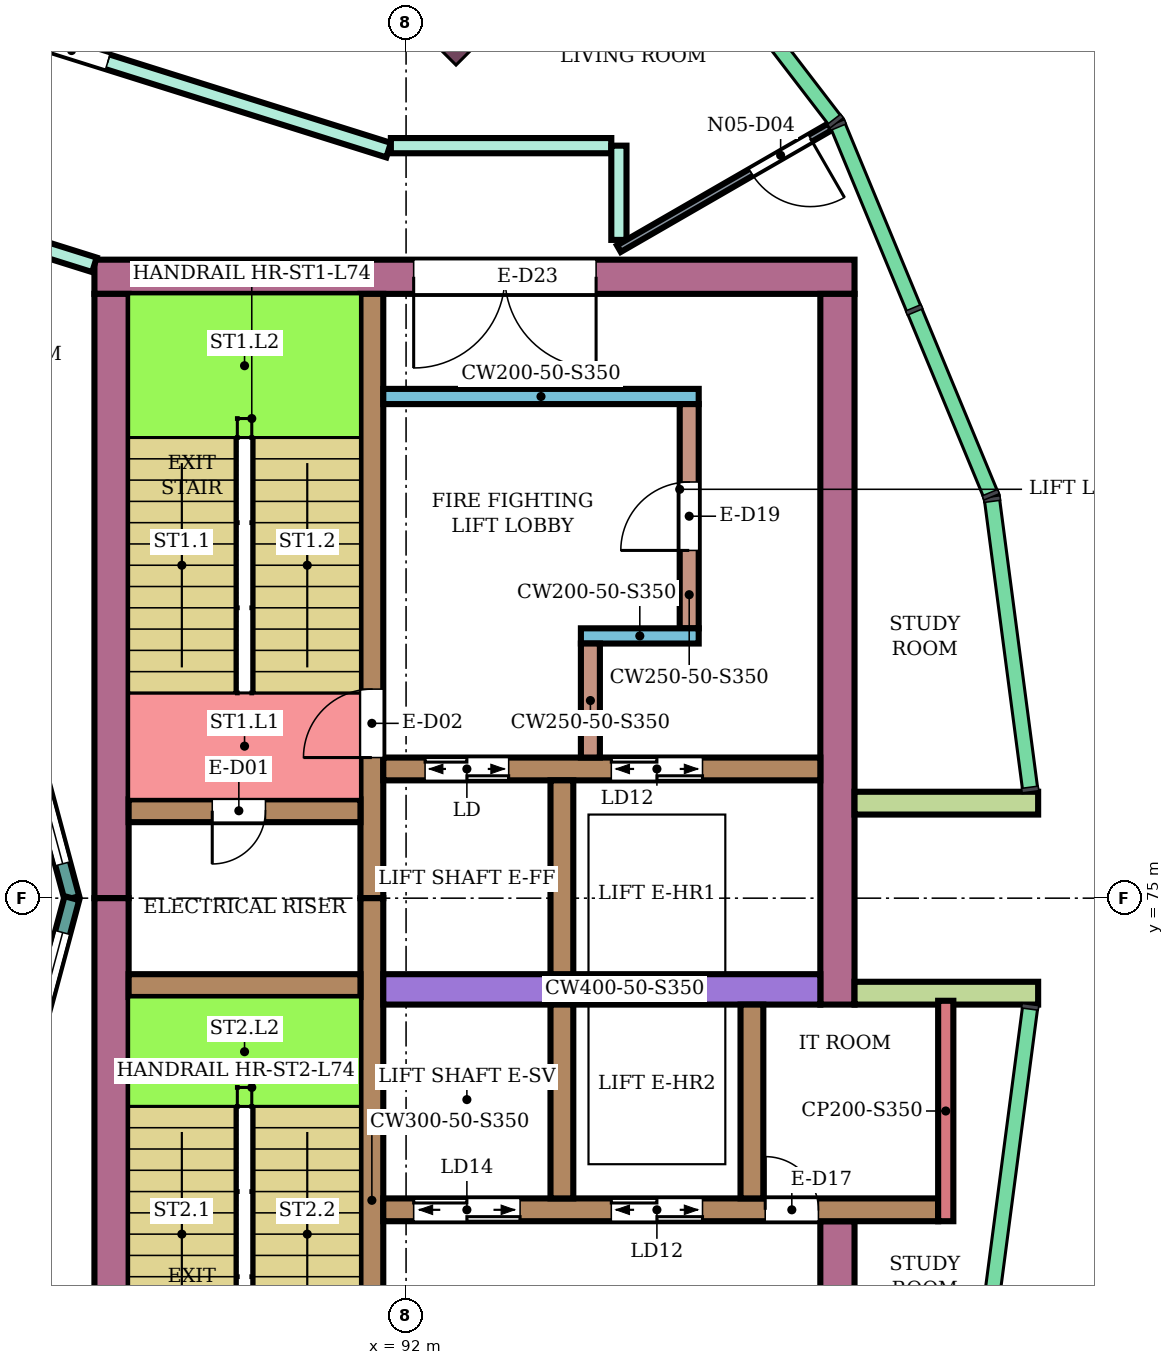
"""IFC4 building model, lengths in metres.
Left out: names, types, materials, properties, quantities, classifications, styles, units other than length and angle.
Written with IfcOpenShell. Run it as: python <this file> out.ifc"""

import sys

from ifc_helpers import new_model, si_unit, direction, frame, frame_2d, origin, origin_2d, place, context, subcontext, project, spatial, rectangle, extrude, element, fill, save


model = new_model("IFC4")
c1 = context("Model", 3, precision=1e-05, world=origin(), true_north=direction((0.0, 1.0)))
c2 = subcontext(c1, "Body", "Model", "MODEL_VIEW")
j1 = project(units=[si_unit("LENGTHUNIT", "METRE"), si_unit("PLANEANGLEUNIT", "RADIAN")], contexts=[c1])
p1 = place(None, origin())
s1 = spatial("IfcSite", under=j1, at=p1, CompositionType="ELEMENT")
p2 = place(p1, origin())
s2 = spatial("IfcBuilding", under=s1, at=p2, CompositionType="ELEMENT")
p3 = place(p2, frame((0.0, 0.0, 323.7)))
s3 = spatial("IfcBuildingStorey", under=s2, at=p3, CompositionType="ELEMENT", Elevation=323.7)
p4 = place(p3, frame((92.233, 87.233, 0.0), z_axis=(0.0, 0.0, 1.0), x_axis=(0.707106781187, 0.707106781187, 0.0)))
e1 = element("IfcColumn", 1, at=p4, inside=s3, PredefinedType="COLUMN", context=c2, shape_type="SweptSolid", body=[
    extrude(rectangle(XDim=1.2, YDim=2.4, at=origin_2d()), origin(), (0.0, 0.0, 1.0), 4.4),
])
p5 = place(p3, frame((87.9, 83.175, 0.0), z_axis=(0.0, 0.0, 1.0), x_axis=(1.0, 0.0, 0.0)))
e2 = element("IfcWall", 2, at=p5, inside=s3, PredefinedType="SHEAR", context=c2, shape_type="SweptSolid", body=[
    extrude(rectangle(XDim=10.0, YDim=0.45, at=frame_2d((5.0, 0.0))), origin(), (0.0, 0.0, 1.0), 4.05),
])
p6 = place(p5, frame((4.2, 0.0, 0.0)))
e3 = element("IfcOpeningElement", 3, at=p6, cuts=e2, PredefinedType="OPENING", context=c2, shape_type="SweptSolid", body=[
    extrude(rectangle(XDim=2.4, YDim=2.4, at=frame_2d((1.2, 1.2))), frame((0.0, 0.235, 0.0), z_axis=(0.0, -1.0, 0.0), x_axis=(1.0, 0.0, 0.0)), (0.0, 0.0, 1.0), 0.47),
])
for number, where, z_axis, x_axis in (
    (4, (88.125, 75.0, 0.0), (0.0, 0.0, 1.0), (0.0, 1.0, 0.0)),
    (5, (88.125, 67.05, 0.0), (0.0, 0.0, 1.0), (0.0, 1.0, 0.0)),
):
    element("IfcWall", number, at=place(p3, frame(where, z_axis=z_axis, x_axis=x_axis)), inside=s3, PredefinedType="SHEAR", context=c2, shape_type="SweptSolid", body=[
        extrude(rectangle(XDim=7.95, YDim=0.45, at=frame_2d((3.975, 0.0))), origin(), (0.0, 0.0, 1.0), 4.05),
    ])
p7 = place(p3, frame((97.675, 73.6, 0.0), z_axis=(0.0, 0.0, 1.0), x_axis=(0.0, 1.0, 0.0)))
e6 = element("IfcWall", 6, at=p7, inside=s3, PredefinedType="SHEAR", context=c2, shape_type="SweptSolid", body=[
    extrude(rectangle(XDim=9.35, YDim=0.45, at=frame_2d((4.675, 0.0))), origin(), (0.0, 0.0, 1.0), 4.05),
])
p8 = place(p3, frame((97.675, 67.05, 0.0), z_axis=(0.0, 0.0, 1.0), x_axis=(0.0, 1.0, 0.0)))
e7 = element("IfcWall", 7, at=p8, inside=s3, PredefinedType="SHEAR", context=c2, shape_type="SweptSolid", body=[
    extrude(rectangle(XDim=3.7, YDim=0.45, at=frame_2d((1.85, 0.0))), origin(), (0.0, 0.0, 1.0), 4.05),
])
p9 = place(p3, frame((91.55, 75.0, 0.0), z_axis=(0.0, 0.0, 1.0), x_axis=(0.0, 1.0, 0.0)))
e8 = element("IfcWall", 8, at=p9, inside=s3, PredefinedType="SHEAR", context=c2, shape_type="SweptSolid", body=[
    extrude(rectangle(XDim=7.95, YDim=0.3, at=frame_2d((3.975, 0.0))), origin(), (0.0, 0.0, 1.0), 4.05),
])
p10 = place(p9, frame((1.85, 0.0, 0.0)))
e9 = element("IfcOpeningElement", 9, at=p10, cuts=e8, PredefinedType="OPENING", context=c2, shape_type="SweptSolid", body=[
    extrude(rectangle(XDim=0.9, YDim=2.1, at=frame_2d((0.45, 1.05))), frame((0.0, 0.16, 0.0), z_axis=(0.0, -1.0, 0.0), x_axis=(1.0, 0.0, 0.0)), (0.0, 0.0, 1.0), 0.32),
])
p11 = place(p3, frame((91.55, 67.05, 0.0), z_axis=(0.0, 0.0, 1.0), x_axis=(0.0, 1.0, 0.0)))
e10 = element("IfcWall", 10, at=p11, inside=s3, PredefinedType="SHEAR", context=c2, shape_type="SweptSolid", body=[
    extrude(rectangle(XDim=7.95, YDim=0.3, at=frame_2d((3.975, 0.0))), origin(), (0.0, 0.0, 1.0), 4.05),
])
p12 = place(p11, frame((0.6, 0.0, 0.0)))
e11 = element("IfcOpeningElement", 11, at=p12, cuts=e10, PredefinedType="OPENING", context=c2, shape_type="SweptSolid", body=[
    extrude(rectangle(XDim=0.9, YDim=2.1, at=frame_2d((0.45, 1.05))), frame((0.0, 0.16, 0.0), z_axis=(0.0, -1.0, 0.0), x_axis=(1.0, 0.0, 0.0)), (0.0, 0.0, 1.0), 0.32),
])
p13 = place(p3, frame((88.35, 76.15, 0.0), z_axis=(0.0, 0.0, 1.0), x_axis=(1.0, 0.0, 0.0)))
e12 = element("IfcWall", 12, at=p13, inside=s3, PredefinedType="SHEAR", context=c2, shape_type="SweptSolid", body=[
    extrude(rectangle(XDim=3.05, YDim=0.3, at=frame_2d((1.525, 0.0))), origin(), (0.0, 0.0, 1.0), 4.05),
])
p14 = place(p13, frame((1.1, 0.0, 0.0)))
e13 = element("IfcOpeningElement", 13, at=p14, cuts=e12, PredefinedType="OPENING", context=c2, shape_type="SweptSolid", body=[
    extrude(rectangle(XDim=0.7, YDim=2.0, at=frame_2d((0.35, 1.0))), frame((0.0, 0.16, 0.0), z_axis=(0.0, -1.0, 0.0), x_axis=(1.0, 0.0, 0.0)), (0.0, 0.0, 1.0), 0.32),
])
p15 = place(p3, frame((88.35, 73.85, 0.0), z_axis=(0.0, 0.0, 1.0), x_axis=(1.0, 0.0, 0.0)))
e14 = element("IfcWall", 14, at=p15, inside=s3, PredefinedType="SHEAR", context=c2, shape_type="SweptSolid", body=[
    extrude(rectangle(XDim=3.05, YDim=0.3, at=frame_2d((1.525, 0.0))), origin(), (0.0, 0.0, 1.0), 4.05),
])
p16 = place(p3, frame((91.7, 76.7, 0.0), z_axis=(0.0, 0.0, 1.0), x_axis=(1.0, 0.0, 0.0)))
e15 = element("IfcWall", 15, at=p16, inside=s3, PredefinedType="SHEAR", context=c2, shape_type="SweptSolid", body=[
    extrude(rectangle(XDim=5.75, YDim=0.3, at=frame_2d((2.875, 0.0))), origin(), (0.0, 0.0, 1.0), 4.05),
])
p17 = place(p16, frame((0.55, 0.0, 0.0)))
e16 = element("IfcOpeningElement", 16, at=p17, cuts=e15, PredefinedType="OPENING", context=c2, shape_type="SweptSolid", body=[
    extrude(rectangle(XDim=1.1, YDim=2.1, at=frame_2d((0.55, 1.05))), frame((0.0, 0.16, 0.0), z_axis=(0.0, -1.0, 0.0), x_axis=(1.0, 0.0, 0.0)), (0.0, 0.0, 1.0), 0.32),
])
p18 = place(p16, frame((3.0, 0.0, 0.0)))
e17 = element("IfcOpeningElement", 17, at=p18, cuts=e15, PredefinedType="OPENING", context=c2, shape_type="SweptSolid", body=[
    extrude(rectangle(XDim=1.2, YDim=2.1, at=frame_2d((0.6, 1.05))), frame((0.0, 0.16, 0.0), z_axis=(0.0, -1.0, 0.0), x_axis=(1.0, 0.0, 0.0)), (0.0, 0.0, 1.0), 0.32),
])
p19 = place(p3, frame((91.7, 73.8, 0.0), z_axis=(0.0, 0.0, 1.0), x_axis=(1.0, 0.0, 0.0)))
e18 = element("IfcWall", 18, at=p19, inside=s3, PredefinedType="SHEAR", context=c2, shape_type="SweptSolid", body=[
    extrude(rectangle(XDim=5.75, YDim=0.4, at=frame_2d((2.875, 0.0))), origin(), (0.0, 0.0, 1.0), 4.05),
])
p20 = place(p3, frame((91.7, 70.9, 0.0), z_axis=(0.0, 0.0, 1.0), x_axis=(1.0, 0.0, 0.0)))
e19 = element("IfcWall", 19, at=p20, inside=s3, PredefinedType="SHEAR", context=c2, shape_type="SweptSolid", body=[
    extrude(rectangle(XDim=7.3, YDim=0.3, at=frame_2d((3.65, 0.0))), origin(), (0.0, 0.0, 1.0), 4.05),
])
p21 = place(p20, frame((0.4, 0.0, 0.0)))
e20 = element("IfcOpeningElement", 20, at=p21, cuts=e19, PredefinedType="OPENING", context=c2, shape_type="SweptSolid", body=[
    extrude(rectangle(XDim=1.4, YDim=2.1, at=frame_2d((0.7, 1.05))), frame((0.0, 0.16, 0.0), z_axis=(0.0, -1.0, 0.0), x_axis=(1.0, 0.0, 0.0)), (0.0, 0.0, 1.0), 0.32),
])
p22 = place(p20, frame((3.0, 0.0, 0.0)))
e21 = element("IfcOpeningElement", 21, at=p22, cuts=e19, PredefinedType="OPENING", context=c2, shape_type="SweptSolid", body=[
    extrude(rectangle(XDim=1.2, YDim=2.1, at=frame_2d((0.6, 1.05))), frame((0.0, 0.16, 0.0), z_axis=(0.0, -1.0, 0.0), x_axis=(1.0, 0.0, 0.0)), (0.0, 0.0, 1.0), 0.32),
])
p23 = place(p20, frame((5.025, 0.0, 0.0)))
e22 = element("IfcOpeningElement", 22, at=p23, cuts=e19, PredefinedType="OPENING", context=c2, shape_type="SweptSolid", body=[
    extrude(rectangle(XDim=0.7, YDim=2.1, at=frame_2d((0.35, 1.05))), frame((0.0, 0.16, 0.0), z_axis=(0.0, -1.0, 0.0), x_axis=(1.0, 0.0, 0.0)), (0.0, 0.0, 1.0), 0.32),
])
for number, where, z_axis, x_axis in (
    (23, (94.05, 74.0, 0.0), (0.0, 0.0, 1.0), (0.0, 1.0, 0.0)),
    (24, (94.05, 71.05, 0.0), (0.0, 0.0, 1.0), (0.0, 1.0, 0.0)),
    (25, (96.55, 71.05, 0.0), (0.0, 0.0, 1.0), (0.0, 1.0, 0.0)),
):
    element("IfcWall", number, at=place(p3, frame(where, z_axis=z_axis, x_axis=x_axis)), inside=s3, PredefinedType="SHEAR", context=c2, shape_type="SweptSolid", body=[
        extrude(rectangle(XDim=2.55, YDim=0.3, at=frame_2d((1.275, 0.0))), origin(), (0.0, 0.0, 1.0), 4.05),
    ])
p24 = place(p3, frame((91.7, 81.6, 0.0), z_axis=(0.0, 0.0, 1.0), x_axis=(1.0, 0.0, 0.0)))
e26 = element("IfcWall", 26, at=p24, inside=s3, PredefinedType="SHEAR", context=c2, shape_type="SweptSolid", body=[
    extrude(rectangle(XDim=4.15, YDim=0.2, at=frame_2d((2.075, 0.0))), origin(), (0.0, 0.0, 1.0), 4.05),
])
p25 = place(p3, frame((95.725, 78.55, 0.0), z_axis=(0.0, 0.0, 1.0), x_axis=(0.0, 1.0, 0.0)))
e27 = element("IfcWall", 27, at=p25, inside=s3, PredefinedType="SHEAR", context=c2, shape_type="SweptSolid", body=[
    extrude(rectangle(XDim=2.95, YDim=0.25, at=frame_2d((1.475, 0.0))), origin(), (0.0, 0.0, 1.0), 4.05),
])
p26 = place(p25, frame((1.025, 0.0, 0.0)))
e28 = element("IfcOpeningElement", 28, at=p26, cuts=e27, PredefinedType="OPENING", context=c2, shape_type="SweptSolid", body=[
    extrude(rectangle(XDim=0.9, YDim=2.1, at=frame_2d((0.45, 1.05))), frame((0.0, 0.135, 0.0), z_axis=(0.0, -1.0, 0.0), x_axis=(1.0, 0.0, 0.0)), (0.0, 0.0, 1.0), 0.27),
])
p27 = place(p3, frame((94.3, 78.45, 0.0), z_axis=(0.0, 0.0, 1.0), x_axis=(1.0, 0.0, 0.0)))
e29 = element("IfcWall", 29, at=p27, inside=s3, PredefinedType="SHEAR", context=c2, shape_type="SweptSolid", body=[
    extrude(rectangle(XDim=1.55, YDim=0.2, at=frame_2d((0.775, 0.0))), origin(), (0.0, 0.0, 1.0), 4.05),
])
p28 = place(p3, frame((94.425, 76.85, 0.0), z_axis=(0.0, 0.0, 1.0), x_axis=(0.0, 1.0, 0.0)))
e30 = element("IfcWall", 30, at=p28, inside=s3, PredefinedType="SHEAR", context=c2, shape_type="SweptSolid", body=[
    extrude(rectangle(XDim=1.5, YDim=0.25, at=frame_2d((0.75, 0.0))), origin(), (0.0, 0.0, 1.0), 4.05),
])
for number, where, z_axis, x_axis in (
    (31, (97.9, 73.75, 0.0), (0.0, 0.0, 1.0), (1.0, 0.0, 0.0)),
    (32, (97.9, 76.25, 0.0), (0.0, 0.0, 1.0), (1.0, 0.0, 0.0)),
):
    element("IfcWall", number, at=place(p3, frame(where, z_axis=z_axis, x_axis=x_axis)), inside=s3, PredefinedType="NOTDEFINED", context=c2, shape_type="SweptSolid", body=[
        extrude(rectangle(XDim=2.416, YDim=0.3, at=frame_2d((1.208, 0.0))), origin(), (0.0, 0.0, 1.0), 4.4),
    ])
p29 = place(p3, frame((87.604, 75.0, 0.0), z_axis=(0.0, 0.0, 1.0), x_axis=(-0.258789828301, 0.965933654434, 0.0)))
e33 = element("IfcWall", 33, at=p29, inside=s3, PredefinedType="NOTDEFINED", context=c2, shape_type="SweptSolid", body=[
    extrude(rectangle(XDim=3.936, YDim=0.2, at=frame_2d((1.968, 0.0))), origin(), (0.0, 0.0, 1.0), 4.4),
])
p30 = place(p29, frame((0.468, 0.0, 0.9)))
e34 = element("IfcOpeningElement", 34, at=p30, cuts=e33, PredefinedType="OPENING", context=c2, shape_type="SweptSolid", body=[
    extrude(rectangle(XDim=3.0, YDim=2.3, at=frame_2d((1.5, 1.15))), frame((0.0, 0.11, 0.0), z_axis=(0.0, -1.0, 0.0), x_axis=(1.0, 0.0, 0.0)), (0.0, 0.0, 1.0), 0.22),
])
p31 = place(p3, frame((86.585, 71.198, 0.0), z_axis=(0.0, 0.0, 1.0), x_axis=(0.258789828301, 0.965933654434, 0.0)))
e35 = element("IfcWall", 35, at=p31, inside=s3, PredefinedType="NOTDEFINED", context=c2, shape_type="SweptSolid", body=[
    extrude(rectangle(XDim=3.936, YDim=0.2, at=frame_2d((1.968, 0.0))), origin(), (0.0, 0.0, 1.0), 4.4),
])
p32 = place(p31, frame((0.468, 0.0, 0.9)))
e36 = element("IfcOpeningElement", 36, at=p32, cuts=e35, PredefinedType="OPENING", context=c2, shape_type="SweptSolid", body=[
    extrude(rectangle(XDim=3.0, YDim=2.3, at=frame_2d((1.5, 1.15))), frame((0.0, 0.11, 0.0), z_axis=(0.0, -1.0, 0.0), x_axis=(1.0, 0.0, 0.0)), (0.0, 0.0, 1.0), 0.22),
])
p33 = place(p3, frame((85.587, 84.057, 0.0), z_axis=(0.0, 0.0, 1.0), x_axis=(0.954239513179, -0.299043393987, 0.0)))
e37 = element("IfcWall", 37, at=p33, inside=s3, PredefinedType="PARTITIONING", context=c2, shape_type="SweptSolid", body=[
    extrude(rectangle(XDim=2.424, YDim=0.2, at=frame_2d((1.212, 0.0))), origin(), (0.0, 0.0, 1.0), 3.95),
])
p34 = place(p33, frame((0.762, 0.0, 0.0)))
e38 = element("IfcOpeningElement", 38, at=p34, cuts=e37, PredefinedType="OPENING", context=c2, shape_type="SweptSolid", body=[
    extrude(rectangle(XDim=0.9, YDim=2.1, at=frame_2d((0.45, 1.05))), frame((0.0, 0.11, 0.0), z_axis=(0.0, -1.0, 0.0), x_axis=(1.0, 0.0, 0.0)), (0.0, 0.0, 1.0), 0.22),
])
p35 = place(p3, frame((86.313, 86.555, 0.0), z_axis=(0.0, 0.0, 1.0), x_axis=(0.9540216201, -0.299737799389, 0.0)))
e39 = element("IfcWall", 39, at=p35, inside=s3, PredefinedType="PARTITIONING", context=c2, shape_type="SweptSolid", body=[
    extrude(rectangle(XDim=5.719, YDim=0.2, at=frame_2d((2.86, 0.0))), origin(), (0.0, 0.0, 1.0), 3.95),
])
p36 = place(p35, frame((0.848, 0.0, 0.0)))
e40 = element("IfcOpeningElement", 40, at=p36, cuts=e39, PredefinedType="OPENING", context=c2, shape_type="SweptSolid", body=[
    extrude(rectangle(XDim=1.0, YDim=2.1, at=frame_2d((0.5, 1.05))), frame((0.0, 0.11, 0.0), z_axis=(0.0, -1.0, 0.0), x_axis=(1.0, 0.0, 0.0)), (0.0, 0.0, 1.0), 0.22),
])
p37 = place(p3, frame((91.8, 84.9, 0.0), z_axis=(0.0, 0.0, 1.0), x_axis=(1.0, 0.0, 0.0)))
e41 = element("IfcWall", 41, at=p37, inside=s3, PredefinedType="PARTITIONING", context=c2, shape_type="SweptSolid", body=[
    extrude(rectangle(XDim=2.9, YDim=0.2, at=frame_2d((1.45, 0.0))), origin(), (0.0, 0.0, 1.0), 3.95),
])
p38 = place(p3, frame((94.8, 83.66, 0.0), z_axis=(0.0, 0.0, 1.0), x_axis=(0.0, 1.0, 0.0)))
e42 = element("IfcWall", 42, at=p38, inside=s3, PredefinedType="PARTITIONING", context=c2, shape_type="SweptSolid", body=[
    extrude(rectangle(XDim=1.24, YDim=0.2, at=frame_2d((0.62, 0.0))), origin(), (0.0, 0.0, 1.0), 3.95),
])
p39 = place(p3, frame((94.8, 83.545, 0.0), z_axis=(0.0, 0.0, 1.0), x_axis=(0.866141222235, 0.499799342882, 0.0)))
e43 = element("IfcWall", 43, at=p39, inside=s3, PredefinedType="PARTITIONING", context=c2, shape_type="SweptSolid", body=[
    extrude(rectangle(XDim=3.207, YDim=0.1, at=frame_2d((1.604, 0.0))), origin(), (0.0, 0.0, 1.0), 3.95),
])
p40 = place(p39, frame((2.007, 0.0, 0.0)))
e44 = element("IfcOpeningElement", 44, at=p40, cuts=e43, PredefinedType="OPENING", context=c2, shape_type="SweptSolid", body=[
    extrude(rectangle(XDim=0.9, YDim=2.1, at=frame_2d((0.45, 1.05))), frame((0.0, 0.06, 0.0), z_axis=(0.0, -1.0, 0.0), x_axis=(1.0, 0.0, 0.0)), (0.0, 0.0, 1.0), 0.12),
])
p41 = place(p3, frame((99.1, 70.75, 0.0), z_axis=(0.0, 0.0, 1.0), x_axis=(0.0, 1.0, 0.0)))
e45 = element("IfcWall", 45, at=p41, inside=s3, PredefinedType="PARTITIONING", context=c2, shape_type="SweptSolid", body=[
    extrude(rectangle(XDim=2.9, YDim=0.2, at=frame_2d((1.45, 0.0))), origin(), (0.0, 0.0, 1.0), 4.05),
])
p42 = place(p30, origin())
e46 = element("IfcWindow", 46, at=p42, inside=s3, PartitioningType="SINGLE_PANEL", PredefinedType="WINDOW", context=c2, shape_type="SweptSolid", body=[
    extrude(rectangle(XDim=3.0, YDim=2.3, at=frame_2d((1.5, 1.15))), frame((0.0, 0.03, 0.0), z_axis=(0.0, -1.0, 0.0), x_axis=(1.0, 0.0, 0.0)), (0.0, 0.0, 1.0), 0.06),
])
fill(e34, e46)
p43 = place(p32, origin())
e47 = element("IfcWindow", 47, at=p43, inside=s3, PartitioningType="SINGLE_PANEL", PredefinedType="WINDOW", context=c2, shape_type="SweptSolid", body=[
    extrude(rectangle(XDim=3.0, YDim=2.3, at=frame_2d((1.5, 1.15))), frame((0.0, 0.03, 0.0), z_axis=(0.0, -1.0, 0.0), x_axis=(1.0, 0.0, 0.0)), (0.0, 0.0, 1.0), 0.06),
])
fill(e36, e47)
p44 = place(p36, origin())
e48 = element("IfcDoor", 48, at=p44, inside=s3, OperationType="SINGLE_SWING_LEFT", PredefinedType="DOOR", context=c2, shape_type="SweptSolid", body=[
    extrude(rectangle(XDim=1.0, YDim=2.1, at=frame_2d((0.5, 1.05))), frame((0.0, 0.025, 0.0), z_axis=(0.0, -1.0, 0.0), x_axis=(1.0, 0.0, 0.0)), (0.0, 0.0, 1.0), 0.05),
])
fill(e40, e48)
p45 = place(p40, frame((0.9, 0.0, 0.0), z_axis=(0.0, 0.0, 1.0), x_axis=(-1.0, 0.0, 0.0)))
e49 = element("IfcDoor", 49, at=p45, inside=s3, OperationType="SINGLE_SWING_LEFT", PredefinedType="DOOR", context=c2, shape_type="SweptSolid", body=[
    extrude(rectangle(XDim=0.9, YDim=2.1, at=frame_2d((0.45, 1.05))), frame((0.0, 0.025, 0.0), z_axis=(0.0, -1.0, 0.0), x_axis=(1.0, 0.0, 0.0)), (0.0, 0.0, 1.0), 0.05),
])
fill(e44, e49)
p46 = place(p14, frame((0.7, 0.0, 0.0), z_axis=(0.0, 0.0, 1.0), x_axis=(-1.0, 0.0, 0.0)))
e50 = element("IfcDoor", 50, at=p46, inside=s3, OperationType="SINGLE_SWING_RIGHT", PredefinedType="DOOR", context=c2, shape_type="SweptSolid", body=[
    extrude(rectangle(XDim=0.7, YDim=2.0, at=frame_2d((0.35, 1.0))), frame((0.0, 0.025, 0.0), z_axis=(0.0, -1.0, 0.0), x_axis=(1.0, 0.0, 0.0)), (0.0, 0.0, 1.0), 0.05),
])
fill(e13, e50)
p47 = place(p10, origin())
e51 = element("IfcDoor", 51, at=p47, inside=s3, OperationType="SINGLE_SWING_LEFT", PredefinedType="DOOR", context=c2, shape_type="SweptSolid", body=[
    extrude(rectangle(XDim=0.9, YDim=2.1, at=frame_2d((0.45, 1.05))), frame((0.0, 0.025, 0.0), z_axis=(0.0, -1.0, 0.0), x_axis=(1.0, 0.0, 0.0)), (0.0, 0.0, 1.0), 0.05),
])
fill(e9, e51)
p48 = place(p17, origin())
e52 = element("IfcDoor", 52, at=p48, inside=s3, OperationType="DOUBLE_DOOR_SLIDING", PredefinedType="DOOR", context=c2, shape_type="SweptSolid", body=[
    extrude(rectangle(XDim=1.1, YDim=2.1, at=frame_2d((0.55, 1.05))), frame((0.0, 0.025, 0.0), z_axis=(0.0, -1.0, 0.0), x_axis=(1.0, 0.0, 0.0)), (0.0, 0.0, 1.0), 0.05),
])
fill(e16, e52)
p49 = place(p18, origin())
e53 = element("IfcDoor", 53, at=p49, inside=s3, OperationType="DOUBLE_DOOR_SLIDING", PredefinedType="DOOR", context=c2, shape_type="SweptSolid", body=[
    extrude(rectangle(XDim=1.2, YDim=2.1, at=frame_2d((0.6, 1.05))), frame((0.0, 0.025, 0.0), z_axis=(0.0, -1.0, 0.0), x_axis=(1.0, 0.0, 0.0)), (0.0, 0.0, 1.0), 0.05),
])
fill(e17, e53)
p50 = place(p21, origin())
e54 = element("IfcDoor", 54, at=p50, inside=s3, OperationType="DOUBLE_DOOR_SLIDING", PredefinedType="DOOR", context=c2, shape_type="SweptSolid", body=[
    extrude(rectangle(XDim=1.4, YDim=2.1, at=frame_2d((0.7, 1.05))), frame((0.0, 0.025, 0.0), z_axis=(0.0, -1.0, 0.0), x_axis=(1.0, 0.0, 0.0)), (0.0, 0.0, 1.0), 0.05),
])
fill(e20, e54)
p51 = place(p22, origin())
e55 = element("IfcDoor", 55, at=p51, inside=s3, OperationType="DOUBLE_DOOR_SLIDING", PredefinedType="DOOR", context=c2, shape_type="SweptSolid", body=[
    extrude(rectangle(XDim=1.2, YDim=2.1, at=frame_2d((0.6, 1.05))), frame((0.0, 0.025, 0.0), z_axis=(0.0, -1.0, 0.0), x_axis=(1.0, 0.0, 0.0)), (0.0, 0.0, 1.0), 0.05),
])
fill(e21, e55)
p52 = place(p23, origin())
e56 = element("IfcDoor", 56, at=p52, inside=s3, OperationType="SINGLE_SWING_LEFT", PredefinedType="DOOR", context=c2, shape_type="SweptSolid", body=[
    extrude(rectangle(XDim=0.7, YDim=2.1, at=frame_2d((0.35, 1.05))), frame((0.0, 0.025, 0.0), z_axis=(0.0, -1.0, 0.0), x_axis=(1.0, 0.0, 0.0)), (0.0, 0.0, 1.0), 0.05),
])
fill(e22, e56)
p53 = place(p26, origin())
e57 = element("IfcDoor", 57, at=p53, inside=s3, OperationType="SINGLE_SWING_LEFT", PredefinedType="DOOR", context=c2, shape_type="SweptSolid", body=[
    extrude(rectangle(XDim=0.9, YDim=2.1, at=frame_2d((0.45, 1.05))), frame((0.0, 0.025, 0.0), z_axis=(0.0, -1.0, 0.0), x_axis=(1.0, 0.0, 0.0)), (0.0, 0.0, 1.0), 0.05),
])
fill(e28, e57)
p54 = place(p6, frame((2.4, 0.0, 0.0), z_axis=(0.0, 0.0, 1.0), x_axis=(-1.0, 0.0, 0.0)))
e58 = element("IfcDoor", 58, at=p54, inside=s3, OperationType="DOUBLE_DOOR_SINGLE_SWING", PredefinedType="DOOR", context=c2, shape_type="SweptSolid", body=[
    extrude(rectangle(XDim=2.4, YDim=2.4, at=frame_2d((1.2, 1.2))), frame((0.0, 0.025, 0.0), z_axis=(0.0, -1.0, 0.0), x_axis=(1.0, 0.0, 0.0)), (0.0, 0.0, 1.0), 0.05),
])
fill(e3, e58)
save(model, sys.argv[1])
